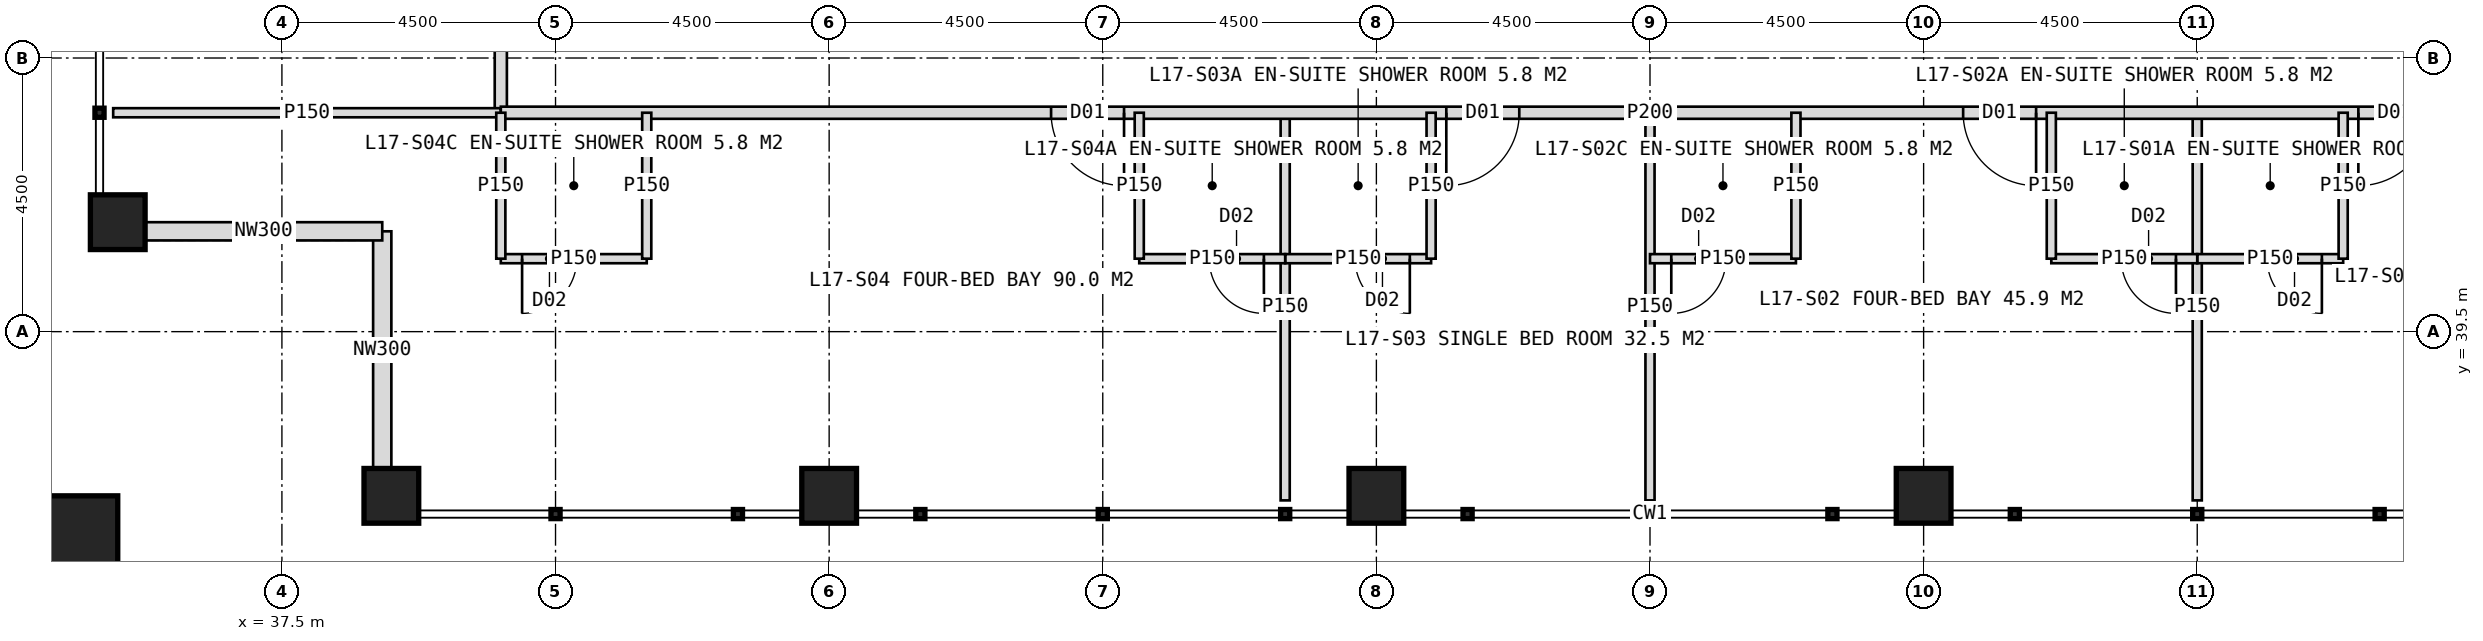
"""IFC4 building model, lengths in metres.
Left out: names, types, materials, properties, quantities, classifications, styles, units other than length and angle.
Written with IfcOpenShell. Run it as: python <this file> out.ifc"""

import sys

from ifc_helpers import new_model, si_unit, direction, frame, frame_2d, origin, origin_2d, place, context, subcontext, project, spatial, rectangle, hollow_rectangle, extrude, element, fill, save


model = new_model("IFC4")
c1 = context("Model", 3, precision=1e-05, world=origin(), true_north=direction((0.0, 1.0)))
c2 = subcontext(c1, "Body", "Model", "MODEL_VIEW")
j1 = project(units=[si_unit("LENGTHUNIT", "METRE"), si_unit("PLANEANGLEUNIT", "RADIAN")], contexts=[c1])
p1 = place(None, origin())
s1 = spatial("IfcSite", under=j1, at=p1, CompositionType="ELEMENT")
p2 = place(p1, origin())
s2 = spatial("IfcBuilding", under=s1, at=p2, CompositionType="ELEMENT")
p3 = place(p2, frame((0.0, 0.0, 75.0)))
s3 = spatial("IfcBuildingStorey", under=s2, at=p3, CompositionType="ELEMENT", Elevation=75.0)
for number, where, z_axis, x_axis in (
    (1, (39.3, 36.8, 0.0), (0.0, 0.0, 1.0), (1.0, 0.0, 0.0)),
    (2, (34.8, 41.3, 0.0), (0.0, 0.0, 1.0), (1.0, 0.0, 0.0)),
    (3, (46.5, 36.8, 0.0), (0.0, 0.0, 1.0), (1.0, 0.0, 0.0)),
    (4, (55.5, 36.8, 0.0), (0.0, 0.0, 1.0), (1.0, 0.0, 0.0)),
    (5, (64.5, 36.8, 0.0), (0.0, 0.0, 1.0), (1.0, 0.0, 0.0)),
):
    element("IfcColumn", number, at=place(p3, frame(where, z_axis=z_axis, x_axis=x_axis)), inside=s3, PredefinedType="COLUMN", context=c2, shape_type="SweptSolid", body=[
        extrude(hollow_rectangle(XDim=0.9, YDim=0.9, WallThickness=0.08, at=origin_2d()), origin(), (0.0, 0.0, 1.0), 4.0),
    ])
p4 = place(p3, frame((33.9, 35.9, 0.0), z_axis=(0.0, 0.0, 1.0), x_axis=(1.0, 0.0, 0.0)))
e6 = element("IfcColumn", 6, at=p4, inside=s3, PredefinedType="COLUMN", context=c2, shape_type="SweptSolid", body=[
    extrude(hollow_rectangle(XDim=1.8, YDim=1.8, WallThickness=0.1, at=origin_2d()), origin(), (0.0, 0.0, 1.0), 4.0),
])
for number, where, z_axis, x_axis in (
    (7, (39.15, 37.25, 0.0), (0.0, 0.0, 1.0), (0.0, 1.0, 0.0)),
    (8, (39.15, 41.15, 0.0), (0.0, 0.0, 1.0), (-1.0, 0.0, 0.0)),
):
    element("IfcWall", number, at=place(p3, frame(where, z_axis=z_axis, x_axis=x_axis)), inside=s3, PredefinedType="ELEMENTEDWALL", context=c2, shape_type="SweptSolid", body=[
        extrude(rectangle(XDim=3.9, YDim=0.3, at=frame_2d((1.95, 0.0))), origin(), (0.0, 0.0, 1.0), 2.95),
    ])
p5 = place(p3, frame((41.1, 43.1, 0.0), z_axis=(0.0, 0.0, 1.0), x_axis=(0.0, 1.0, 0.0)))
e9 = element("IfcWall", 9, at=p5, inside=s3, PredefinedType="PARTITIONING", context=c2, shape_type="SweptSolid", body=[
    extrude(rectangle(XDim=37.8, YDim=0.2, at=frame_2d((18.9, 0.0))), origin(), (0.0, 0.0, 1.0), 3.75),
])
p6 = place(p5, frame((2.45, 0.0, 0.0)))
e10 = element("IfcOpeningElement", 10, at=p6, cuts=e9, PredefinedType="OPENING", context=c2, shape_type="SweptSolid", body=[
    extrude(rectangle(XDim=1.2, YDim=2.2, at=frame_2d((0.6, 1.1))), frame((0.0, 0.11, 0.0), z_axis=(0.0, -1.0, 0.0), x_axis=(1.0, 0.0, 0.0)), (0.0, 0.0, 1.0), 0.22),
])
p7 = place(p5, frame((9.55, 0.0, 0.0)))
e11 = element("IfcOpeningElement", 11, at=p7, cuts=e9, PredefinedType="OPENING", context=c2, shape_type="SweptSolid", body=[
    extrude(rectangle(XDim=1.2, YDim=2.2, at=frame_2d((0.6, 1.1))), frame((0.0, 0.11, 0.0), z_axis=(0.0, -1.0, 0.0), x_axis=(1.0, 0.0, 0.0)), (0.0, 0.0, 1.0), 0.22),
])
p8 = place(p5, frame((15.05, 0.0, 0.0)))
e12 = element("IfcOpeningElement", 12, at=p8, cuts=e9, PredefinedType="OPENING", context=c2, shape_type="SweptSolid", body=[
    extrude(rectangle(XDim=1.2, YDim=2.2, at=frame_2d((0.6, 1.1))), frame((0.0, 0.11, 0.0), z_axis=(0.0, -1.0, 0.0), x_axis=(1.0, 0.0, 0.0)), (0.0, 0.0, 1.0), 0.22),
])
p9 = place(p5, frame((21.55, 0.0, 0.0)))
e13 = element("IfcOpeningElement", 13, at=p9, cuts=e9, PredefinedType="OPENING", context=c2, shape_type="SweptSolid", body=[
    extrude(rectangle(XDim=1.2, YDim=2.2, at=frame_2d((0.6, 1.1))), frame((0.0, 0.11, 0.0), z_axis=(0.0, -1.0, 0.0), x_axis=(1.0, 0.0, 0.0)), (0.0, 0.0, 1.0), 0.22),
])
p10 = place(p5, frame((33.95, 0.0, 0.0)))
e14 = element("IfcOpeningElement", 14, at=p10, cuts=e9, PredefinedType="OPENING", context=c2, shape_type="SweptSolid", body=[
    extrude(rectangle(XDim=1.2, YDim=2.2, at=frame_2d((0.6, 1.1))), frame((0.0, 0.11, 0.0), z_axis=(0.0, -1.0, 0.0), x_axis=(1.0, 0.0, 0.0)), (0.0, 0.0, 1.0), 0.22),
])
for number, where, z_axis, x_axis in (
    (15, (41.1, 43.1, 0.0), (0.0, 0.0, 1.0), (-1.0, 0.0, 0.0)),
    (16, (69.0, 43.1, 0.0), (0.0, 0.0, 1.0), (0.0, -1.0, 0.0)),
):
    element("IfcWall", number, at=place(p3, frame(where, z_axis=z_axis, x_axis=x_axis)), inside=s3, PredefinedType="PARTITIONING", context=c2, shape_type="SweptSolid", body=[
        extrude(rectangle(XDim=6.375, YDim=0.15, at=frame_2d((3.188, 0.0))), origin(), (0.0, 0.0, 1.0), 3.75),
    ])
p11 = place(p3, frame((60.0, 43.1, 0.0), z_axis=(0.0, 0.0, 1.0), x_axis=(0.0, -1.0, 0.0)))
e17 = element("IfcWall", 17, at=p11, inside=s3, PredefinedType="PARTITIONING", context=c2, shape_type="SweptSolid", body=[
    extrude(rectangle(XDim=6.375, YDim=0.15, at=frame_2d((3.188, 0.0))), origin(), (0.0, 0.0, 1.0), 2.75),
])
p12 = place(p3, frame((54.0, 43.1, 0.0), z_axis=(0.0, 0.0, 1.0), x_axis=(0.0, -1.0, 0.0)))
e18 = element("IfcWall", 18, at=p12, inside=s3, PredefinedType="PARTITIONING", context=c2, shape_type="SweptSolid", body=[
    extrude(rectangle(XDim=6.375, YDim=0.15, at=frame_2d((3.188, 0.0))), origin(), (0.0, 0.0, 1.0), 3.75),
])
p13 = place(p3, frame((78.9, 43.1, 0.0), z_axis=(0.0, 0.0, 1.0), x_axis=(-1.0, 0.0, 0.0)))
e19 = element("IfcWall", 19, at=p13, inside=s3, PredefinedType="PARTITIONING", context=c2, shape_type="SweptSolid", body=[
    extrude(rectangle(XDim=37.8, YDim=0.2, at=frame_2d((18.9, 0.0))), origin(), (0.0, 0.0, 1.0), 3.75),
])
p14 = place(p13, frame((6.05, 0.0, 0.0)))
e20 = element("IfcOpeningElement", 20, at=p14, cuts=e19, PredefinedType="OPENING", context=c2, shape_type="SweptSolid", body=[
    extrude(rectangle(XDim=1.2, YDim=2.2, at=frame_2d((0.6, 1.1))), frame((0.0, 0.11, 0.0), z_axis=(0.0, -1.0, 0.0), x_axis=(1.0, 0.0, 0.0)), (0.0, 0.0, 1.0), 0.22),
])
p15 = place(p13, frame((12.55, 0.0, 0.0)))
e21 = element("IfcOpeningElement", 21, at=p15, cuts=e19, PredefinedType="OPENING", context=c2, shape_type="SweptSolid", body=[
    extrude(rectangle(XDim=1.2, YDim=2.2, at=frame_2d((0.6, 1.1))), frame((0.0, 0.11, 0.0), z_axis=(0.0, -1.0, 0.0), x_axis=(1.0, 0.0, 0.0)), (0.0, 0.0, 1.0), 0.22),
])
p16 = place(p13, frame((21.05, 0.0, 0.0)))
e22 = element("IfcOpeningElement", 22, at=p16, cuts=e19, PredefinedType="OPENING", context=c2, shape_type="SweptSolid", body=[
    extrude(rectangle(XDim=1.2, YDim=2.2, at=frame_2d((0.6, 1.1))), frame((0.0, 0.11, 0.0), z_axis=(0.0, -1.0, 0.0), x_axis=(1.0, 0.0, 0.0)), (0.0, 0.0, 1.0), 0.22),
])
p17 = place(p13, frame((27.55, 0.0, 0.0)))
e23 = element("IfcOpeningElement", 23, at=p17, cuts=e19, PredefinedType="OPENING", context=c2, shape_type="SweptSolid", body=[
    extrude(rectangle(XDim=1.2, YDim=2.2, at=frame_2d((0.6, 1.1))), frame((0.0, 0.11, 0.0), z_axis=(0.0, -1.0, 0.0), x_axis=(1.0, 0.0, 0.0)), (0.0, 0.0, 1.0), 0.22),
])
p18 = place(p3, frame((71.4, 40.7, 0.0), z_axis=(0.0, 0.0, 1.0), x_axis=(-1.0, 0.0, 0.0)))
e24 = element("IfcWall", 24, at=p18, inside=s3, PredefinedType="PARTITIONING", context=c2, shape_type="SweptSolid", body=[
    extrude(rectangle(XDim=2.4, YDim=0.15, at=frame_2d((1.2, 0.0))), origin(), (0.0, 0.0, 1.0), 3.75),
])
p19 = place(p18, frame((0.35, 0.0, 0.0)))
e25 = element("IfcOpeningElement", 25, at=p19, cuts=e24, PredefinedType="OPENING", context=c2, shape_type="SweptSolid", body=[
    extrude(rectangle(XDim=0.9, YDim=2.1, at=frame_2d((0.45, 1.05))), frame((0.0, 0.085, 0.0), z_axis=(0.0, -1.0, 0.0), x_axis=(1.0, 0.0, 0.0)), (0.0, 0.0, 1.0), 0.17),
])
p20 = place(p3, frame((71.4, 43.1, 0.0), z_axis=(0.0, 0.0, 1.0), x_axis=(0.0, -1.0, 0.0)))
e26 = element("IfcWall", 26, at=p20, inside=s3, PredefinedType="PARTITIONING", context=c2, shape_type="SweptSolid", body=[
    extrude(rectangle(XDim=2.4, YDim=0.15, at=frame_2d((1.2, 0.0))), origin(), (0.0, 0.0, 1.0), 3.75),
])
p21 = place(p3, frame((69.0, 40.7, 0.0), z_axis=(0.0, 0.0, 1.0), x_axis=(-1.0, 0.0, 0.0)))
e27 = element("IfcWall", 27, at=p21, inside=s3, PredefinedType="PARTITIONING", context=c2, shape_type="SweptSolid", body=[
    extrude(rectangle(XDim=2.4, YDim=0.15, at=frame_2d((1.2, 0.0))), origin(), (0.0, 0.0, 1.0), 3.75),
])
p22 = place(p21, frame((0.35, 0.0, 0.0)))
e28 = element("IfcOpeningElement", 28, at=p22, cuts=e27, PredefinedType="OPENING", context=c2, shape_type="SweptSolid", body=[
    extrude(rectangle(XDim=0.9, YDim=2.1, at=frame_2d((0.45, 1.05))), frame((0.0, 0.085, 0.0), z_axis=(0.0, -1.0, 0.0), x_axis=(1.0, 0.0, 0.0)), (0.0, 0.0, 1.0), 0.17),
])
p23 = place(p3, frame((66.6, 43.1, 0.0), z_axis=(0.0, 0.0, 1.0), x_axis=(0.0, -1.0, 0.0)))
e29 = element("IfcWall", 29, at=p23, inside=s3, PredefinedType="PARTITIONING", context=c2, shape_type="SweptSolid", body=[
    extrude(rectangle(XDim=2.4, YDim=0.15, at=frame_2d((1.2, 0.0))), origin(), (0.0, 0.0, 1.0), 3.75),
])
p24 = place(p3, frame((62.4, 40.7, 0.0), z_axis=(0.0, 0.0, 1.0), x_axis=(-1.0, 0.0, 0.0)))
e30 = element("IfcWall", 30, at=p24, inside=s3, PredefinedType="PARTITIONING", context=c2, shape_type="SweptSolid", body=[
    extrude(rectangle(XDim=2.4, YDim=0.15, at=frame_2d((1.2, 0.0))), origin(), (0.0, 0.0, 1.0), 3.75),
])
p25 = place(p24, frame((1.15, 0.0, 0.0)))
e31 = element("IfcOpeningElement", 31, at=p25, cuts=e30, PredefinedType="OPENING", context=c2, shape_type="SweptSolid", body=[
    extrude(rectangle(XDim=0.9, YDim=2.1, at=frame_2d((0.45, 1.05))), frame((0.0, 0.085, 0.0), z_axis=(0.0, -1.0, 0.0), x_axis=(1.0, 0.0, 0.0)), (0.0, 0.0, 1.0), 0.17),
])
p26 = place(p3, frame((62.4, 43.1, 0.0), z_axis=(0.0, 0.0, 1.0), x_axis=(0.0, -1.0, 0.0)))
e32 = element("IfcWall", 32, at=p26, inside=s3, PredefinedType="PARTITIONING", context=c2, shape_type="SweptSolid", body=[
    extrude(rectangle(XDim=2.4, YDim=0.15, at=frame_2d((1.2, 0.0))), origin(), (0.0, 0.0, 1.0), 3.75),
])
p27 = place(p3, frame((56.4, 40.7, 0.0), z_axis=(0.0, 0.0, 1.0), x_axis=(-1.0, 0.0, 0.0)))
e33 = element("IfcWall", 33, at=p27, inside=s3, PredefinedType="PARTITIONING", context=c2, shape_type="SweptSolid", body=[
    extrude(rectangle(XDim=2.4, YDim=0.15, at=frame_2d((1.2, 0.0))), origin(), (0.0, 0.0, 1.0), 3.75),
])
p28 = place(p27, frame((0.35, 0.0, 0.0)))
e34 = element("IfcOpeningElement", 34, at=p28, cuts=e33, PredefinedType="OPENING", context=c2, shape_type="SweptSolid", body=[
    extrude(rectangle(XDim=0.9, YDim=2.1, at=frame_2d((0.45, 1.05))), frame((0.0, 0.085, 0.0), z_axis=(0.0, -1.0, 0.0), x_axis=(1.0, 0.0, 0.0)), (0.0, 0.0, 1.0), 0.17),
])
p29 = place(p3, frame((56.4, 43.1, 0.0), z_axis=(0.0, 0.0, 1.0), x_axis=(0.0, -1.0, 0.0)))
e35 = element("IfcWall", 35, at=p29, inside=s3, PredefinedType="PARTITIONING", context=c2, shape_type="SweptSolid", body=[
    extrude(rectangle(XDim=2.4, YDim=0.15, at=frame_2d((1.2, 0.0))), origin(), (0.0, 0.0, 1.0), 3.75),
])
p30 = place(p3, frame((54.0, 40.7, 0.0), z_axis=(0.0, 0.0, 1.0), x_axis=(-1.0, 0.0, 0.0)))
e36 = element("IfcWall", 36, at=p30, inside=s3, PredefinedType="PARTITIONING", context=c2, shape_type="SweptSolid", body=[
    extrude(rectangle(XDim=2.4, YDim=0.15, at=frame_2d((1.2, 0.0))), origin(), (0.0, 0.0, 1.0), 3.75),
])
p31 = place(p30, frame((0.35, 0.0, 0.0)))
e37 = element("IfcOpeningElement", 37, at=p31, cuts=e36, PredefinedType="OPENING", context=c2, shape_type="SweptSolid", body=[
    extrude(rectangle(XDim=0.9, YDim=2.1, at=frame_2d((0.45, 1.05))), frame((0.0, 0.085, 0.0), z_axis=(0.0, -1.0, 0.0), x_axis=(1.0, 0.0, 0.0)), (0.0, 0.0, 1.0), 0.17),
])
p32 = place(p3, frame((51.6, 43.1, 0.0), z_axis=(0.0, 0.0, 1.0), x_axis=(0.0, -1.0, 0.0)))
e38 = element("IfcWall", 38, at=p32, inside=s3, PredefinedType="PARTITIONING", context=c2, shape_type="SweptSolid", body=[
    extrude(rectangle(XDim=2.4, YDim=0.15, at=frame_2d((1.2, 0.0))), origin(), (0.0, 0.0, 1.0), 3.75),
])
p33 = place(p3, frame((43.5, 40.7, 0.0), z_axis=(0.0, 0.0, 1.0), x_axis=(-1.0, 0.0, 0.0)))
e39 = element("IfcWall", 39, at=p33, inside=s3, PredefinedType="PARTITIONING", context=c2, shape_type="SweptSolid", body=[
    extrude(rectangle(XDim=2.4, YDim=0.15, at=frame_2d((1.2, 0.0))), origin(), (0.0, 0.0, 1.0), 3.75),
])
p34 = place(p33, frame((1.15, 0.0, 0.0)))
e40 = element("IfcOpeningElement", 40, at=p34, cuts=e39, PredefinedType="OPENING", context=c2, shape_type="SweptSolid", body=[
    extrude(rectangle(XDim=0.9, YDim=2.1, at=frame_2d((0.45, 1.05))), frame((0.0, 0.085, 0.0), z_axis=(0.0, -1.0, 0.0), x_axis=(1.0, 0.0, 0.0)), (0.0, 0.0, 1.0), 0.17),
])
for number, where, z_axis, x_axis in (
    (41, (43.5, 43.1, 0.0), (0.0, 0.0, 1.0), (0.0, -1.0, 0.0)),
    (42, (41.1, 43.1, 0.0), (0.0, 0.0, 1.0), (0.0, -1.0, 0.0)),
):
    element("IfcWall", number, at=place(p3, frame(where, z_axis=z_axis, x_axis=x_axis)), inside=s3, PredefinedType="PARTITIONING", context=c2, shape_type="SweptSolid", body=[
        extrude(rectangle(XDim=2.4, YDim=0.15, at=frame_2d((1.2, 0.0))), origin(), (0.0, 0.0, 1.0), 3.75),
    ])
p35 = place(p14, origin())
e43 = element("IfcDoor", 43, at=p35, inside=s3, OperationType="SINGLE_SWING_RIGHT", PredefinedType="DOOR", context=c2, shape_type="SweptSolid", body=[
    extrude(rectangle(XDim=1.2, YDim=2.2, at=frame_2d((0.6, 1.1))), frame((0.0, 0.025, 0.0), z_axis=(0.0, -1.0, 0.0), x_axis=(1.0, 0.0, 0.0)), (0.0, 0.0, 1.0), 0.05),
])
fill(e20, e43)
p36 = place(p19, origin())
e44 = element("IfcDoor", 44, at=p36, inside=s3, OperationType="SINGLE_SWING_LEFT", PredefinedType="DOOR", context=c2, shape_type="SweptSolid", body=[
    extrude(rectangle(XDim=0.9, YDim=2.1, at=frame_2d((0.45, 1.05))), frame((0.0, 0.025, 0.0), z_axis=(0.0, -1.0, 0.0), x_axis=(1.0, 0.0, 0.0)), (0.0, 0.0, 1.0), 0.05),
])
fill(e25, e44)
p37 = place(p15, origin())
e45 = element("IfcDoor", 45, at=p37, inside=s3, OperationType="SINGLE_SWING_LEFT", PredefinedType="DOOR", context=c2, shape_type="SweptSolid", body=[
    extrude(rectangle(XDim=1.2, YDim=2.2, at=frame_2d((0.6, 1.1))), frame((0.0, 0.025, 0.0), z_axis=(0.0, -1.0, 0.0), x_axis=(1.0, 0.0, 0.0)), (0.0, 0.0, 1.0), 0.05),
])
fill(e21, e45)
p38 = place(p22, origin())
e46 = element("IfcDoor", 46, at=p38, inside=s3, OperationType="SINGLE_SWING_LEFT", PredefinedType="DOOR", context=c2, shape_type="SweptSolid", body=[
    extrude(rectangle(XDim=0.9, YDim=2.1, at=frame_2d((0.45, 1.05))), frame((0.0, 0.025, 0.0), z_axis=(0.0, -1.0, 0.0), x_axis=(1.0, 0.0, 0.0)), (0.0, 0.0, 1.0), 0.05),
])
fill(e28, e46)
p39 = place(p25, origin())
e47 = element("IfcDoor", 47, at=p39, inside=s3, OperationType="SINGLE_SWING_RIGHT", PredefinedType="DOOR", context=c2, shape_type="SweptSolid", body=[
    extrude(rectangle(XDim=0.9, YDim=2.1, at=frame_2d((0.45, 1.05))), frame((0.0, 0.025, 0.0), z_axis=(0.0, -1.0, 0.0), x_axis=(1.0, 0.0, 0.0)), (0.0, 0.0, 1.0), 0.05),
])
fill(e31, e47)
p40 = place(p16, origin())
e48 = element("IfcDoor", 48, at=p40, inside=s3, OperationType="SINGLE_SWING_RIGHT", PredefinedType="DOOR", context=c2, shape_type="SweptSolid", body=[
    extrude(rectangle(XDim=1.2, YDim=2.2, at=frame_2d((0.6, 1.1))), frame((0.0, 0.025, 0.0), z_axis=(0.0, -1.0, 0.0), x_axis=(1.0, 0.0, 0.0)), (0.0, 0.0, 1.0), 0.05),
])
fill(e22, e48)
p41 = place(p28, origin())
e49 = element("IfcDoor", 49, at=p41, inside=s3, OperationType="SINGLE_SWING_LEFT", PredefinedType="DOOR", context=c2, shape_type="SweptSolid", body=[
    extrude(rectangle(XDim=0.9, YDim=2.1, at=frame_2d((0.45, 1.05))), frame((0.0, 0.025, 0.0), z_axis=(0.0, -1.0, 0.0), x_axis=(1.0, 0.0, 0.0)), (0.0, 0.0, 1.0), 0.05),
])
fill(e34, e49)
p42 = place(p17, origin())
e50 = element("IfcDoor", 50, at=p42, inside=s3, OperationType="SINGLE_SWING_LEFT", PredefinedType="DOOR", context=c2, shape_type="SweptSolid", body=[
    extrude(rectangle(XDim=1.2, YDim=2.2, at=frame_2d((0.6, 1.1))), frame((0.0, 0.025, 0.0), z_axis=(0.0, -1.0, 0.0), x_axis=(1.0, 0.0, 0.0)), (0.0, 0.0, 1.0), 0.05),
])
fill(e23, e50)
p43 = place(p31, origin())
e51 = element("IfcDoor", 51, at=p43, inside=s3, OperationType="SINGLE_SWING_LEFT", PredefinedType="DOOR", context=c2, shape_type="SweptSolid", body=[
    extrude(rectangle(XDim=0.9, YDim=2.1, at=frame_2d((0.45, 1.05))), frame((0.0, 0.025, 0.0), z_axis=(0.0, -1.0, 0.0), x_axis=(1.0, 0.0, 0.0)), (0.0, 0.0, 1.0), 0.05),
])
fill(e37, e51)
p44 = place(p34, origin())
e52 = element("IfcDoor", 52, at=p44, inside=s3, OperationType="SINGLE_SWING_RIGHT", PredefinedType="DOOR", context=c2, shape_type="SweptSolid", body=[
    extrude(rectangle(XDim=0.9, YDim=2.1, at=frame_2d((0.45, 1.05))), frame((0.0, 0.025, 0.0), z_axis=(0.0, -1.0, 0.0), x_axis=(1.0, 0.0, 0.0)), (0.0, 0.0, 1.0), 0.05),
])
fill(e40, e52)
save(model, sys.argv[1])
